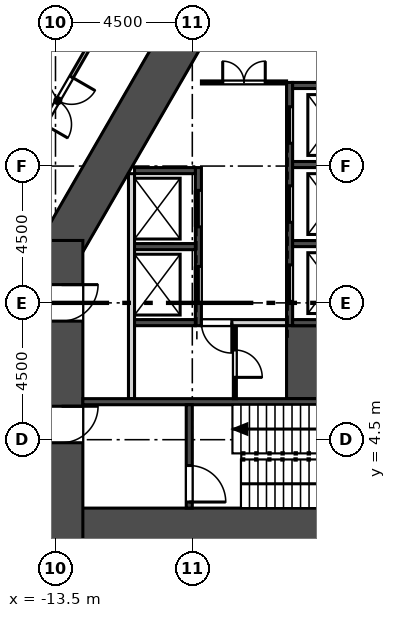
"""IFC4 building model, lengths in metres.
Left out: names, types, materials, properties, quantities, classifications, styles, units other than length and angle.
Written with IfcOpenShell. Run it as: python <this file> out.ifc"""

import sys

from ifc_helpers import new_model, si_unit, direction, frame, frame_2d, origin, place, context, subcontext, project, spatial, rectangle, extrude, element, fill, save


model = new_model("IFC4")
c1 = context("Model", 3, precision=1e-05, world=origin(), true_north=direction((0.0, 1.0)))
c2 = subcontext(c1, "Body", "Model", "MODEL_VIEW")
j1 = project(units=[si_unit("LENGTHUNIT", "METRE"), si_unit("PLANEANGLEUNIT", "RADIAN")], contexts=[c1])
p1 = place(None, origin())
s1 = spatial("IfcSite", under=j1, at=p1, CompositionType="ELEMENT")
p2 = place(p1, origin())
s2 = spatial("IfcBuilding", under=s1, at=p2, CompositionType="ELEMENT")
p3 = place(p2, frame((0.0, 0.0, 25.0)))
s3 = spatial("IfcBuildingStorey", under=s2, at=p3, CompositionType="ELEMENT", Elevation=25.0)
p4 = place(p3, frame((-14.0, 1.55, 0.0), z_axis=(0.0, 0.0, 1.0), x_axis=(1.0, 0.0, 0.0)))
e1 = element("IfcWall", 1, at=p4, inside=s3, PredefinedType="SHEAR", context=c2, shape_type="SweptSolid", body=[
    extrude(rectangle(XDim=28.0, YDim=1.4, at=frame_2d((14.0, 0.0))), origin(), (0.0, 0.0, 1.0), 4.5),
])
p5 = place(p3, frame((-8.805, 18.65, 0.0), z_axis=(0.0, 0.0, 1.0), x_axis=(-0.50000187635, -0.866024320471, 0.0)))
e2 = element("IfcWall", 2, at=p5, inside=s3, PredefinedType="SHEAR", context=c2, shape_type="SweptSolid", body=[
    extrude(rectangle(XDim=9.177, YDim=1.4, at=frame_2d((4.588, 0.0))), origin(), (0.0, 0.0, 1.0), 4.5),
])
p6 = place(p3, frame((-13.3, 11.052, 0.0), z_axis=(0.0, 0.0, 1.0), x_axis=(0.0, -1.0, 0.0)))
e3 = element("IfcWall", 3, at=p6, inside=s3, PredefinedType="SHEAR", context=c2, shape_type="SweptSolid", body=[
    extrude(rectangle(XDim=10.202, YDim=1.4, at=frame_2d((5.101, 0.0))), origin(), (0.0, 0.0, 1.0), 4.5),
])
p7 = place(p6, frame((5.453, 0.0, 0.0)))
e4 = element("IfcOpeningElement", 4, at=p7, cuts=e3, PredefinedType="OPENING", context=c2, shape_type="SweptSolid", body=[
    extrude(rectangle(XDim=1.2, YDim=2.1, at=frame_2d((0.6, 1.05))), frame((0.0, 0.71, 0.0), z_axis=(0.0, -1.0, 0.0), x_axis=(1.0, 0.0, 0.0)), (0.0, 0.0, 1.0), 1.42),
])
p8 = place(p6, frame((1.453, 0.0, 0.0)))
e5 = element("IfcOpeningElement", 5, at=p8, cuts=e3, PredefinedType="OPENING", context=c2, shape_type="SweptSolid", body=[
    extrude(rectangle(XDim=1.2, YDim=2.1, at=frame_2d((0.6, 1.05))), frame((0.0, 0.71, 0.0), z_axis=(0.0, -1.0, 0.0), x_axis=(1.0, 0.0, 0.0)), (0.0, 0.0, 1.0), 1.42),
])
p9 = place(p3, frame((-4.353, 56.207, 0.0), z_axis=(0.0, 0.0, 1.0), x_axis=(-0.500000836325, -0.866024920931, 0.0)))
e6 = element("IfcWall", 6, at=p9, inside=s3, PredefinedType="SOLIDWALL", context=c2, shape_type="SweptSolid", body=[
    extrude(rectangle(XDim=56.0, YDim=0.34, at=frame_2d((28.0, 0.0))), origin(), (0.0, 0.0, 1.0), 4.2),
])
p10 = place(p9, frame((1.5, 0.0, 0.9)))
e7 = element("IfcOpeningElement", 7, at=p10, cuts=e6, PredefinedType="OPENING", context=c2, shape_type="SweptSolid", body=[
    extrude(rectangle(XDim=1.885, YDim=3.0, at=frame_2d((0.942, 1.5))), frame((0.0, 0.18, 0.0), z_axis=(0.0, -1.0, 0.0), x_axis=(1.0, 0.0, 0.0)), (0.0, 0.0, 1.0), 0.36),
])
p11 = place(p9, frame((4.5, 0.0, 0.9)))
e8 = element("IfcOpeningElement", 8, at=p11, cuts=e6, PredefinedType="OPENING", context=c2, shape_type="SweptSolid", body=[
    extrude(rectangle(XDim=1.885, YDim=3.0, at=frame_2d((0.942, 1.5))), frame((0.0, 0.18, 0.0), z_axis=(0.0, -1.0, 0.0), x_axis=(1.0, 0.0, 0.0)), (0.0, 0.0, 1.0), 0.36),
])
p12 = place(p9, frame((7.5, 0.0, 0.9)))
e9 = element("IfcOpeningElement", 9, at=p12, cuts=e6, PredefinedType="OPENING", context=c2, shape_type="SweptSolid", body=[
    extrude(rectangle(XDim=1.885, YDim=3.0, at=frame_2d((0.942, 1.5))), frame((0.0, 0.18, 0.0), z_axis=(0.0, -1.0, 0.0), x_axis=(1.0, 0.0, 0.0)), (0.0, 0.0, 1.0), 0.36),
])
p13 = place(p9, frame((10.5, 0.0, 0.9)))
e10 = element("IfcOpeningElement", 10, at=p13, cuts=e6, PredefinedType="OPENING", context=c2, shape_type="SweptSolid", body=[
    extrude(rectangle(XDim=1.885, YDim=3.0, at=frame_2d((0.942, 1.5))), frame((0.0, 0.18, 0.0), z_axis=(0.0, -1.0, 0.0), x_axis=(1.0, 0.0, 0.0)), (0.0, 0.0, 1.0), 0.36),
])
p14 = place(p9, frame((13.5, 0.0, 0.9)))
e11 = element("IfcOpeningElement", 11, at=p14, cuts=e6, PredefinedType="OPENING", context=c2, shape_type="SweptSolid", body=[
    extrude(rectangle(XDim=1.885, YDim=3.0, at=frame_2d((0.942, 1.5))), frame((0.0, 0.18, 0.0), z_axis=(0.0, -1.0, 0.0), x_axis=(1.0, 0.0, 0.0)), (0.0, 0.0, 1.0), 0.36),
])
p15 = place(p9, frame((16.5, 0.0, 0.9)))
e12 = element("IfcOpeningElement", 12, at=p15, cuts=e6, PredefinedType="OPENING", context=c2, shape_type="SweptSolid", body=[
    extrude(rectangle(XDim=1.885, YDim=3.0, at=frame_2d((0.942, 1.5))), frame((0.0, 0.18, 0.0), z_axis=(0.0, -1.0, 0.0), x_axis=(1.0, 0.0, 0.0)), (0.0, 0.0, 1.0), 0.36),
])
p16 = place(p9, frame((19.5, 0.0, 0.9)))
e13 = element("IfcOpeningElement", 13, at=p16, cuts=e6, PredefinedType="OPENING", context=c2, shape_type="SweptSolid", body=[
    extrude(rectangle(XDim=1.885, YDim=3.0, at=frame_2d((0.942, 1.5))), frame((0.0, 0.18, 0.0), z_axis=(0.0, -1.0, 0.0), x_axis=(1.0, 0.0, 0.0)), (0.0, 0.0, 1.0), 0.36),
])
p17 = place(p9, frame((22.5, 0.0, 0.9)))
e14 = element("IfcOpeningElement", 14, at=p17, cuts=e6, PredefinedType="OPENING", context=c2, shape_type="SweptSolid", body=[
    extrude(rectangle(XDim=1.885, YDim=3.0, at=frame_2d((0.942, 1.5))), frame((0.0, 0.18, 0.0), z_axis=(0.0, -1.0, 0.0), x_axis=(1.0, 0.0, 0.0)), (0.0, 0.0, 1.0), 0.36),
])
p18 = place(p9, frame((25.5, 0.0, 0.0)))
e15 = element("IfcOpeningElement", 15, at=p18, cuts=e6, PredefinedType="OPENING", context=c2, shape_type="SweptSolid", body=[
    extrude(rectangle(XDim=1.885, YDim=2.6, at=frame_2d((0.942, 1.3))), frame((0.0, 0.18, 0.0), z_axis=(0.0, -1.0, 0.0), x_axis=(1.0, 0.0, 0.0)), (0.0, 0.0, 1.0), 0.36),
])
p19 = place(p9, frame((28.5, 0.0, 0.9)))
e16 = element("IfcOpeningElement", 16, at=p19, cuts=e6, PredefinedType="OPENING", context=c2, shape_type="SweptSolid", body=[
    extrude(rectangle(XDim=1.885, YDim=3.0, at=frame_2d((0.942, 1.5))), frame((0.0, 0.18, 0.0), z_axis=(0.0, -1.0, 0.0), x_axis=(1.0, 0.0, 0.0)), (0.0, 0.0, 1.0), 0.36),
])
p20 = place(p9, frame((31.5, 0.0, 0.9)))
e17 = element("IfcOpeningElement", 17, at=p20, cuts=e6, PredefinedType="OPENING", context=c2, shape_type="SweptSolid", body=[
    extrude(rectangle(XDim=1.885, YDim=3.0, at=frame_2d((0.942, 1.5))), frame((0.0, 0.18, 0.0), z_axis=(0.0, -1.0, 0.0), x_axis=(1.0, 0.0, 0.0)), (0.0, 0.0, 1.0), 0.36),
])
p21 = place(p9, frame((34.5, 0.0, 0.9)))
e18 = element("IfcOpeningElement", 18, at=p21, cuts=e6, PredefinedType="OPENING", context=c2, shape_type="SweptSolid", body=[
    extrude(rectangle(XDim=1.885, YDim=3.0, at=frame_2d((0.942, 1.5))), frame((0.0, 0.18, 0.0), z_axis=(0.0, -1.0, 0.0), x_axis=(1.0, 0.0, 0.0)), (0.0, 0.0, 1.0), 0.36),
])
p22 = place(p9, frame((37.5, 0.0, 0.9)))
e19 = element("IfcOpeningElement", 19, at=p22, cuts=e6, PredefinedType="OPENING", context=c2, shape_type="SweptSolid", body=[
    extrude(rectangle(XDim=1.885, YDim=3.0, at=frame_2d((0.942, 1.5))), frame((0.0, 0.18, 0.0), z_axis=(0.0, -1.0, 0.0), x_axis=(1.0, 0.0, 0.0)), (0.0, 0.0, 1.0), 0.36),
])
p23 = place(p9, frame((40.5, 0.0, 0.9)))
e20 = element("IfcOpeningElement", 20, at=p23, cuts=e6, PredefinedType="OPENING", context=c2, shape_type="SweptSolid", body=[
    extrude(rectangle(XDim=1.885, YDim=3.0, at=frame_2d((0.942, 1.5))), frame((0.0, 0.18, 0.0), z_axis=(0.0, -1.0, 0.0), x_axis=(1.0, 0.0, 0.0)), (0.0, 0.0, 1.0), 0.36),
])
p24 = place(p9, frame((43.5, 0.0, 0.9)))
e21 = element("IfcOpeningElement", 21, at=p24, cuts=e6, PredefinedType="OPENING", context=c2, shape_type="SweptSolid", body=[
    extrude(rectangle(XDim=1.885, YDim=3.0, at=frame_2d((0.942, 1.5))), frame((0.0, 0.18, 0.0), z_axis=(0.0, -1.0, 0.0), x_axis=(1.0, 0.0, 0.0)), (0.0, 0.0, 1.0), 0.36),
])
p25 = place(p9, frame((46.5, 0.0, 0.9)))
e22 = element("IfcOpeningElement", 22, at=p25, cuts=e6, PredefinedType="OPENING", context=c2, shape_type="SweptSolid", body=[
    extrude(rectangle(XDim=1.885, YDim=3.0, at=frame_2d((0.942, 1.5))), frame((0.0, 0.18, 0.0), z_axis=(0.0, -1.0, 0.0), x_axis=(1.0, 0.0, 0.0)), (0.0, 0.0, 1.0), 0.36),
])
p26 = place(p9, frame((49.5, 0.0, 0.9)))
e23 = element("IfcOpeningElement", 23, at=p26, cuts=e6, PredefinedType="OPENING", context=c2, shape_type="SweptSolid", body=[
    extrude(rectangle(XDim=1.885, YDim=3.0, at=frame_2d((0.942, 1.5))), frame((0.0, 0.18, 0.0), z_axis=(0.0, -1.0, 0.0), x_axis=(1.0, 0.0, 0.0)), (0.0, 0.0, 1.0), 0.36),
])
p27 = place(p9, frame((52.5, 0.0, 0.9)))
e24 = element("IfcOpeningElement", 24, at=p27, cuts=e6, PredefinedType="OPENING", context=c2, shape_type="SweptSolid", body=[
    extrude(rectangle(XDim=1.885, YDim=3.0, at=frame_2d((0.942, 1.5))), frame((0.0, 0.18, 0.0), z_axis=(0.0, -1.0, 0.0), x_axis=(1.0, 0.0, 0.0)), (0.0, 0.0, 1.0), 0.36),
])
p28 = place(p3, frame((-11.0, 5.85, 0.0), z_axis=(0.0, 0.0, 1.0), x_axis=(0.0, 1.0, 0.0)))
e25 = element("IfcWall", 25, at=p28, inside=s3, PredefinedType="SOLIDWALL", context=c2, shape_type="SweptSolid", body=[
    extrude(rectangle(XDim=7.4, YDim=0.2, at=frame_2d((3.7, 0.0))), origin(), (0.0, 0.0, 1.0), 4.2),
])
p29 = place(p3, frame((-8.8, 8.25, -2.0), z_axis=(0.0, 0.0, 1.0), x_axis=(0.0, 1.0, 0.0)))
e26 = element("IfcWall", 26, at=p29, inside=s3, PredefinedType="SOLIDWALL", context=c2, shape_type="SweptSolid", body=[
    extrude(rectangle(XDim=5.2, YDim=0.2, at=frame_2d((2.6, 0.0))), origin(), (0.0, 0.0, 1.0), 6.2),
])
p30 = place(p29, frame((0.75, 0.0, 2.0)))
e27 = element("IfcOpeningElement", 27, at=p30, cuts=e26, PredefinedType="OPENING", context=c2, shape_type="SweptSolid", body=[
    extrude(rectangle(XDim=1.2, YDim=2.1, at=frame_2d((0.6, 1.05))), frame((0.0, 0.11, 0.0), z_axis=(0.0, -1.0, 0.0), x_axis=(1.0, 0.0, 0.0)), (0.0, 0.0, 1.0), 0.22),
])
p31 = place(p29, frame((3.25, 0.0, 2.0)))
e28 = element("IfcOpeningElement", 28, at=p31, cuts=e26, PredefinedType="OPENING", context=c2, shape_type="SweptSolid", body=[
    extrude(rectangle(XDim=1.2, YDim=2.1, at=frame_2d((0.6, 1.05))), frame((0.0, 0.11, 0.0), z_axis=(0.0, -1.0, 0.0), x_axis=(1.0, 0.0, 0.0)), (0.0, 0.0, 1.0), 0.22),
])
p32 = place(p3, frame((-5.8, 8.25, -2.0), z_axis=(0.0, 0.0, 1.0), x_axis=(0.0, 1.0, 0.0)))
e29 = element("IfcWall", 29, at=p32, inside=s3, PredefinedType="SOLIDWALL", context=c2, shape_type="SweptSolid", body=[
    extrude(rectangle(XDim=8.0, YDim=0.2, at=frame_2d((4.0, 0.0))), origin(), (0.0, 0.0, 1.0), 6.2),
])
p33 = place(p32, frame((0.8, 0.0, 2.0)))
e30 = element("IfcOpeningElement", 30, at=p33, cuts=e29, PredefinedType="OPENING", context=c2, shape_type="SweptSolid", body=[
    extrude(rectangle(XDim=1.2, YDim=2.1, at=frame_2d((0.6, 1.05))), frame((0.0, 0.11, 0.0), z_axis=(0.0, -1.0, 0.0), x_axis=(1.0, 0.0, 0.0)), (0.0, 0.0, 1.0), 0.22),
])
p34 = place(p32, frame((3.4, 0.0, 2.0)))
e31 = element("IfcOpeningElement", 31, at=p34, cuts=e29, PredefinedType="OPENING", context=c2, shape_type="SweptSolid", body=[
    extrude(rectangle(XDim=1.2, YDim=2.1, at=frame_2d((0.6, 1.05))), frame((0.0, 0.11, 0.0), z_axis=(0.0, -1.0, 0.0), x_axis=(1.0, 0.0, 0.0)), (0.0, 0.0, 1.0), 0.22),
])
p35 = place(p32, frame((6.0, 0.0, 2.0)))
e32 = element("IfcOpeningElement", 32, at=p35, cuts=e29, PredefinedType="OPENING", context=c2, shape_type="SweptSolid", body=[
    extrude(rectangle(XDim=1.2, YDim=2.1, at=frame_2d((0.6, 1.05))), frame((0.0, 0.11, 0.0), z_axis=(0.0, -1.0, 0.0), x_axis=(1.0, 0.0, 0.0)), (0.0, 0.0, 1.0), 0.22),
])
p36 = place(p3, frame((-5.2, 5.85, -2.0), z_axis=(0.0, 0.0, 1.0), x_axis=(0.0, 1.0, 0.0)))
e33 = element("IfcWall", 33, at=p36, inside=s3, PredefinedType="SOLIDWALL", context=c2, shape_type="SweptSolid", body=[
    extrude(rectangle(XDim=2.4, YDim=1.4, at=frame_2d((1.2, 0.0))), origin(), (0.0, 0.0, 1.0), 6.2),
])
p37 = place(p3, frame((-10.9, 8.35, -2.0), z_axis=(0.0, 0.0, 1.0), x_axis=(1.0, 0.0, 0.0)))
e34 = element("IfcWall", 34, at=p37, inside=s3, PredefinedType="SOLIDWALL", context=c2, shape_type="SweptSolid", body=[
    extrude(rectangle(XDim=2.0, YDim=0.2, at=frame_2d((1.0, 0.0))), origin(), (0.0, 0.0, 1.0), 6.2),
])
p38 = place(p3, frame((-5.7, 8.35, -2.0), z_axis=(0.0, 0.0, 1.0), x_axis=(1.0, 0.0, 0.0)))
e35 = element("IfcWall", 35, at=p38, inside=s3, PredefinedType="SOLIDWALL", context=c2, shape_type="SweptSolid", body=[
    extrude(rectangle(XDim=4.2, YDim=0.2, at=frame_2d((2.1, 0.0))), origin(), (0.0, 0.0, 1.0), 6.2),
])
p39 = place(p3, frame((-12.6, 5.75, -2.0), z_axis=(0.0, 0.0, 1.0), x_axis=(1.0, 0.0, 0.0)))
e36 = element("IfcWall", 36, at=p39, inside=s3, PredefinedType="SOLIDWALL", context=c2, shape_type="SweptSolid", body=[
    extrude(rectangle(XDim=11.4, YDim=0.2, at=frame_2d((5.7, 0.0))), origin(), (0.0, 0.0, 1.0), 6.2),
])
p40 = place(p3, frame((-9.1, 2.25, -2.0), z_axis=(0.0, 0.0, 1.0), x_axis=(0.0, 1.0, 0.0)))
e37 = element("IfcWall", 37, at=p40, inside=s3, PredefinedType="SOLIDWALL", context=c2, shape_type="SweptSolid", body=[
    extrude(rectangle(XDim=3.4, YDim=0.2, at=frame_2d((1.7, 0.0))), origin(), (0.0, 0.0, 1.0), 6.2),
])
p41 = place(p40, frame((0.2, 0.0, 2.0)))
e38 = element("IfcOpeningElement", 38, at=p41, cuts=e37, PredefinedType="OPENING", context=c2, shape_type="SweptSolid", body=[
    extrude(rectangle(XDim=1.2, YDim=2.1, at=frame_2d((0.6, 1.05))), frame((0.0, 0.11, 0.0), z_axis=(0.0, -1.0, 0.0), x_axis=(1.0, 0.0, 0.0)), (0.0, 0.0, 1.0), 0.22),
])
for number, where, z_axis, x_axis in (
    (39, (-10.9, 10.85, -2.0), (0.0, 0.0, 1.0), (1.0, 0.0, 0.0)),
    (40, (-10.9, 13.35, -2.0), (0.0, 0.0, 1.0), (1.0, 0.0, 0.0)),
    (41, (-5.7, 10.95, -2.0), (0.0, 0.0, 1.0), (1.0, 0.0, 0.0)),
    (42, (-5.7, 13.55, -2.0), (0.0, 0.0, 1.0), (1.0, 0.0, 0.0)),
    (43, (-5.7, 16.15, -2.0), (0.0, 0.0, 1.0), (1.0, 0.0, 0.0)),
):
    element("IfcWall", number, at=place(p3, frame(where, z_axis=z_axis, x_axis=x_axis)), inside=s3, PredefinedType="SOLIDWALL", context=c2, shape_type="SweptSolid", body=[
        extrude(rectangle(XDim=2.0, YDim=0.2, at=frame_2d((1.0, 0.0))), origin(), (0.0, 0.0, 1.0), 6.2),
    ])
p42 = place(p3, frame((-8.7, 16.25, 0.0), z_axis=(0.0, 0.0, 1.0), x_axis=(1.0, 0.0, 0.0)))
e44 = element("IfcWall", 44, at=p42, inside=s3, PredefinedType="PARTITIONING", context=c2, shape_type="SweptSolid", body=[
    extrude(rectangle(XDim=2.8, YDim=0.1, at=frame_2d((1.4, 0.0))), origin(), (0.0, 0.0, 1.0), 4.2),
])
p43 = place(p42, frame((0.7, 0.0, 0.0)))
e45 = element("IfcOpeningElement", 45, at=p43, cuts=e44, PredefinedType="OPENING", context=c2, shape_type="SweptSolid", body=[
    extrude(rectangle(XDim=1.4, YDim=2.1, at=frame_2d((0.7, 1.05))), frame((0.0, 0.06, 0.0), z_axis=(0.0, -1.0, 0.0), x_axis=(1.0, 0.0, 0.0)), (0.0, 0.0, 1.0), 0.12),
])
p44 = place(p3, frame((-7.6, 5.85, 0.0), z_axis=(0.0, 0.0, 1.0), x_axis=(0.0, 1.0, 0.0)))
e46 = element("IfcWall", 46, at=p44, inside=s3, PredefinedType="PARTITIONING", context=c2, shape_type="SweptSolid", body=[
    extrude(rectangle(XDim=2.4, YDim=0.1, at=frame_2d((1.2, 0.0))), origin(), (0.0, 0.0, 1.0), 4.2),
])
p45 = place(p44, frame((0.7, 0.0, 0.0)))
e47 = element("IfcOpeningElement", 47, at=p45, cuts=e46, PredefinedType="OPENING", context=c2, shape_type="SweptSolid", body=[
    extrude(rectangle(XDim=0.9, YDim=2.1, at=frame_2d((0.45, 1.05))), frame((0.0, 0.06, 0.0), z_axis=(0.0, -1.0, 0.0), x_axis=(1.0, 0.0, 0.0)), (0.0, 0.0, 1.0), 0.12),
])
p46 = place(p3, frame((-8.7, 8.35, 0.0), z_axis=(0.0, 0.0, 1.0), x_axis=(1.0, 0.0, 0.0)))
e48 = element("IfcWall", 48, at=p46, inside=s3, PredefinedType="SOLIDWALL", context=c2, shape_type="SweptSolid", body=[
    extrude(rectangle(XDim=2.8, YDim=0.2, at=frame_2d((1.4, 0.0))), origin(), (0.0, 0.0, 1.0), 4.2),
])
p47 = place(p46, origin())
e49 = element("IfcOpeningElement", 49, at=p47, cuts=e48, PredefinedType="OPENING", context=c2, shape_type="SweptSolid", body=[
    extrude(rectangle(XDim=1.0, YDim=2.1, at=frame_2d((0.5, 1.05))), frame((0.0, 0.11, 0.0), z_axis=(0.0, -1.0, 0.0), x_axis=(1.0, 0.0, 0.0)), (0.0, 0.0, 1.0), 0.22),
])
p48 = place(p3, frame((-15.784, 11.562, 0.0), z_axis=(0.0, 0.0, 1.0), x_axis=(0.500006656899, 0.866021560388, 0.0)))
e50 = element("IfcWall", 50, at=p48, inside=s3, PredefinedType="PARTITIONING", context=c2, shape_type="SweptSolid", body=[
    extrude(rectangle(XDim=9.444, YDim=0.125, at=frame_2d((4.722, 0.0))), origin(), (0.0, 0.0, 1.0), 4.2),
])
p49 = place(p48, frame((3.822, 0.0, 0.0)))
e51 = element("IfcOpeningElement", 51, at=p49, cuts=e50, PredefinedType="OPENING", context=c2, shape_type="SweptSolid", body=[
    extrude(rectangle(XDim=1.8, YDim=2.1, at=frame_2d((0.9, 1.05))), frame((0.0, 0.073, 0.0), z_axis=(0.0, -1.0, 0.0), x_axis=(1.0, 0.0, 0.0)), (0.0, 0.0, 1.0), 0.145),
])
p50 = place(p3, frame((-18.912, 11.649, 0.0), z_axis=(0.0, 0.0, 1.0), x_axis=(0.500010179592, 0.866019526514, 0.0)))
e52 = element("IfcWall", 52, at=p50, inside=s3, PredefinedType="PARTITIONING", context=c2, shape_type="SweptSolid", body=[
    extrude(rectangle(XDim=11.85, YDim=0.15, at=frame_2d((5.925, 0.0))), origin(), (0.0, 0.0, 1.0), 4.2),
])
p51 = place(p50, frame((5.425, 0.0, 0.0)))
e53 = element("IfcOpeningElement", 53, at=p51, cuts=e52, PredefinedType="OPENING", context=c2, shape_type="SweptSolid", body=[
    extrude(rectangle(XDim=1.0, YDim=2.1, at=frame_2d((0.5, 1.05))), frame((0.0, 0.085, 0.0), z_axis=(0.0, -1.0, 0.0), x_axis=(1.0, 0.0, 0.0)), (0.0, 0.0, 1.0), 0.17),
])
p52 = place(p30, origin())
e54 = element("IfcDoor", 54, at=p52, inside=s3, OperationType="SLIDING_TO_LEFT", PredefinedType="DOOR", context=c2, shape_type="SweptSolid", body=[
    extrude(rectangle(XDim=1.2, YDim=2.1, at=frame_2d((0.6, 1.05))), frame((0.0, 0.025, 0.0), z_axis=(0.0, -1.0, 0.0), x_axis=(1.0, 0.0, 0.0)), (0.0, 0.0, 1.0), 0.05),
])
fill(e27, e54)
p53 = place(p31, origin())
e55 = element("IfcDoor", 55, at=p53, inside=s3, OperationType="SLIDING_TO_LEFT", PredefinedType="DOOR", context=c2, shape_type="SweptSolid", body=[
    extrude(rectangle(XDim=1.2, YDim=2.1, at=frame_2d((0.6, 1.05))), frame((0.0, 0.025, 0.0), z_axis=(0.0, -1.0, 0.0), x_axis=(1.0, 0.0, 0.0)), (0.0, 0.0, 1.0), 0.05),
])
fill(e28, e55)
p54 = place(p33, origin())
e56 = element("IfcDoor", 56, at=p54, inside=s3, OperationType="SLIDING_TO_LEFT", PredefinedType="DOOR", context=c2, shape_type="SweptSolid", body=[
    extrude(rectangle(XDim=1.2, YDim=2.1, at=frame_2d((0.6, 1.05))), frame((0.0, 0.025, 0.0), z_axis=(0.0, -1.0, 0.0), x_axis=(1.0, 0.0, 0.0)), (0.0, 0.0, 1.0), 0.05),
])
fill(e30, e56)
p55 = place(p34, origin())
e57 = element("IfcDoor", 57, at=p55, inside=s3, OperationType="SLIDING_TO_LEFT", PredefinedType="DOOR", context=c2, shape_type="SweptSolid", body=[
    extrude(rectangle(XDim=1.2, YDim=2.1, at=frame_2d((0.6, 1.05))), frame((0.0, 0.025, 0.0), z_axis=(0.0, -1.0, 0.0), x_axis=(1.0, 0.0, 0.0)), (0.0, 0.0, 1.0), 0.05),
])
fill(e31, e57)
p56 = place(p35, origin())
e58 = element("IfcDoor", 58, at=p56, inside=s3, OperationType="SLIDING_TO_LEFT", PredefinedType="DOOR", context=c2, shape_type="SweptSolid", body=[
    extrude(rectangle(XDim=1.2, YDim=2.1, at=frame_2d((0.6, 1.05))), frame((0.0, 0.025, 0.0), z_axis=(0.0, -1.0, 0.0), x_axis=(1.0, 0.0, 0.0)), (0.0, 0.0, 1.0), 0.05),
])
fill(e32, e58)
p57 = place(p43, origin())
e59 = element("IfcDoor", 59, at=p57, inside=s3, OperationType="DOUBLE_DOOR_SINGLE_SWING", PredefinedType="DOOR", context=c2, shape_type="SweptSolid", body=[
    extrude(rectangle(XDim=1.4, YDim=2.1, at=frame_2d((0.7, 1.05))), frame((0.0, 0.025, 0.0), z_axis=(0.0, -1.0, 0.0), x_axis=(1.0, 0.0, 0.0)), (0.0, 0.0, 1.0), 0.05),
])
fill(e45, e59)
p58 = place(p47, frame((1.0, 0.0, 0.0), z_axis=(0.0, 0.0, 1.0), x_axis=(-1.0, 0.0, 0.0)))
e60 = element("IfcDoor", 60, at=p58, inside=s3, OperationType="SINGLE_SWING_LEFT", PredefinedType="DOOR", context=c2, shape_type="SweptSolid", body=[
    extrude(rectangle(XDim=1.0, YDim=2.1, at=frame_2d((0.5, 1.05))), frame((0.0, 0.025, 0.0), z_axis=(0.0, -1.0, 0.0), x_axis=(1.0, 0.0, 0.0)), (0.0, 0.0, 1.0), 0.05),
])
fill(e49, e60)
p59 = place(p45, frame((0.9, 0.0, 0.0), z_axis=(0.0, 0.0, 1.0), x_axis=(-1.0, 0.0, 0.0)))
e61 = element("IfcDoor", 61, at=p59, inside=s3, OperationType="SINGLE_SWING_RIGHT", PredefinedType="DOOR", context=c2, shape_type="SweptSolid", body=[
    extrude(rectangle(XDim=0.9, YDim=2.1, at=frame_2d((0.45, 1.05))), frame((0.0, 0.025, 0.0), z_axis=(0.0, -1.0, 0.0), x_axis=(1.0, 0.0, 0.0)), (0.0, 0.0, 1.0), 0.05),
])
fill(e47, e61)
p60 = place(p7, origin())
e62 = element("IfcDoor", 62, at=p60, inside=s3, OperationType="SINGLE_SWING_LEFT", PredefinedType="DOOR", context=c2, shape_type="SweptSolid", body=[
    extrude(rectangle(XDim=1.2, YDim=2.1, at=frame_2d((0.6, 1.05))), frame((0.0, 0.025, 0.0), z_axis=(0.0, -1.0, 0.0), x_axis=(1.0, 0.0, 0.0)), (0.0, 0.0, 1.0), 0.05),
])
fill(e4, e62)
p61 = place(p41, frame((1.2, 0.0, 0.0), z_axis=(0.0, 0.0, 1.0), x_axis=(-1.0, 0.0, 0.0)))
e63 = element("IfcDoor", 63, at=p61, inside=s3, OperationType="SINGLE_SWING_RIGHT", PredefinedType="DOOR", context=c2, shape_type="SweptSolid", body=[
    extrude(rectangle(XDim=1.2, YDim=2.1, at=frame_2d((0.6, 1.05))), frame((0.0, 0.025, 0.0), z_axis=(0.0, -1.0, 0.0), x_axis=(1.0, 0.0, 0.0)), (0.0, 0.0, 1.0), 0.05),
])
fill(e38, e63)
p62 = place(p8, origin())
e64 = element("IfcDoor", 64, at=p62, inside=s3, OperationType="SINGLE_SWING_LEFT", PredefinedType="DOOR", context=c2, shape_type="SweptSolid", body=[
    extrude(rectangle(XDim=1.2, YDim=2.1, at=frame_2d((0.6, 1.05))), frame((0.0, 0.025, 0.0), z_axis=(0.0, -1.0, 0.0), x_axis=(1.0, 0.0, 0.0)), (0.0, 0.0, 1.0), 0.05),
])
fill(e5, e64)
p63 = place(p49, frame((1.8, 0.0, 0.0), z_axis=(0.0, 0.0, 1.0), x_axis=(-1.0, 0.0, 0.0)))
e65 = element("IfcDoor", 65, at=p63, inside=s3, OperationType="DOUBLE_DOOR_SINGLE_SWING", PredefinedType="DOOR", context=c2, shape_type="SweptSolid", body=[
    extrude(rectangle(XDim=1.8, YDim=2.1, at=frame_2d((0.9, 1.05))), frame((0.0, 0.025, 0.0), z_axis=(0.0, -1.0, 0.0), x_axis=(1.0, 0.0, 0.0)), (0.0, 0.0, 1.0), 0.05),
])
fill(e51, e65)
save(model, sys.argv[1])
